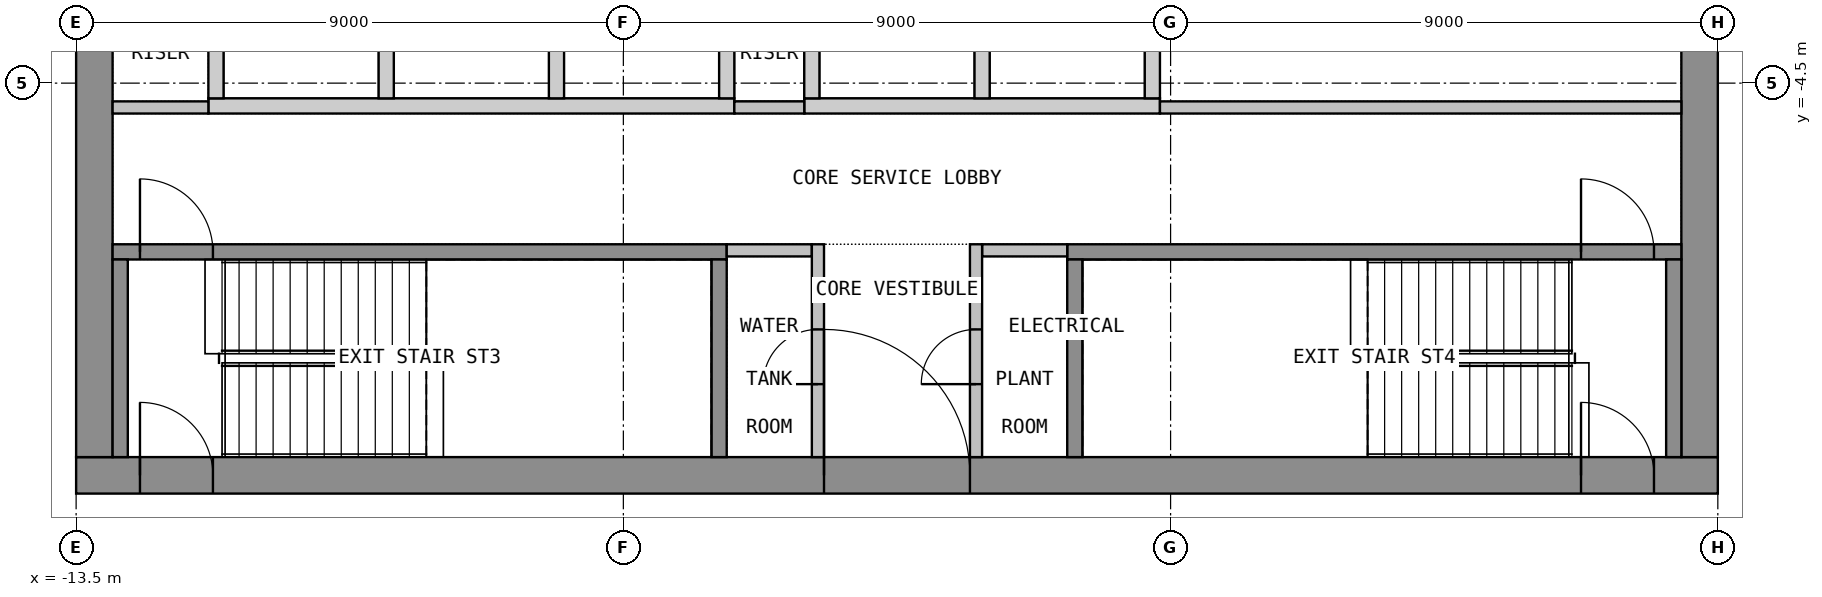
"""IFC4 building model, lengths in metres.
Left out: names, types, materials, properties, quantities, classifications, styles, units other than length and angle.
Written with IfcOpenShell. Run it as: python <this file> out.ifc"""

import sys

from ifc_helpers import new_model, si_unit, direction, frame, frame_2d, origin, place, context, subcontext, project, spatial, polyline, rectangle, outline, extrude, element, fill, save


model = new_model("IFC4")
c1 = context("Model", 3, precision=1e-05, world=origin(), true_north=direction((0.0, 1.0)))
c2 = subcontext(c1, "Body", "Model", "MODEL_VIEW")
j1 = project(units=[si_unit("LENGTHUNIT", "METRE"), si_unit("PLANEANGLEUNIT", "RADIAN")], contexts=[c1])
p1 = place(None, origin())
s1 = spatial("IfcSite", under=j1, at=p1, CompositionType="ELEMENT")
p2 = place(p1, origin())
s2 = spatial("IfcBuilding", under=s1, at=p2, CompositionType="ELEMENT")
p3 = place(p2, frame((0.0, 0.0, 282.0)))
s3 = spatial("IfcBuildingStorey", under=s2, at=p3, CompositionType="ELEMENT", Elevation=282.0)
p4 = place(p3, frame((-13.5, -10.95, 0.0), z_axis=(0.0, 0.0, 1.0), x_axis=(1.0, 0.0, 0.0)))
e1 = element("IfcWall", 1, at=p4, inside=s3, PredefinedType="SHEAR", context=c2, shape_type="SweptSolid", body=[
    extrude(rectangle(XDim=27.0, YDim=0.6, at=frame_2d((13.5, 0.0))), origin(), (0.0, 0.0, 1.0), 4.175),
])
p5 = place(p4, frame((12.3, 0.0, 0.0)))
e2 = element("IfcOpeningElement", 2, at=p5, cuts=e1, PredefinedType="OPENING", context=c2, shape_type="SweptSolid", body=[
    extrude(rectangle(XDim=2.4, YDim=2.1, at=frame_2d((1.2, 1.05))), frame((0.0, 0.31, 0.0), z_axis=(0.0, -1.0, 0.0), x_axis=(1.0, 0.0, 0.0)), (0.0, 0.0, 1.0), 0.62),
])
p6 = place(p4, frame((1.05, 0.0, 0.0)))
e3 = element("IfcOpeningElement", 3, at=p6, cuts=e1, PredefinedType="OPENING", context=c2, shape_type="SweptSolid", body=[
    extrude(rectangle(XDim=1.2, YDim=2.1, at=frame_2d((0.6, 1.05))), frame((0.0, 0.31, 0.0), z_axis=(0.0, -1.0, 0.0), x_axis=(1.0, 0.0, 0.0)), (0.0, 0.0, 1.0), 0.62),
])
p7 = place(p4, frame((24.75, 0.0, 0.0)))
e4 = element("IfcOpeningElement", 4, at=p7, cuts=e1, PredefinedType="OPENING", context=c2, shape_type="SweptSolid", body=[
    extrude(rectangle(XDim=1.2, YDim=2.1, at=frame_2d((0.6, 1.05))), frame((0.0, 0.31, 0.0), z_axis=(0.0, -1.0, 0.0), x_axis=(1.0, 0.0, 0.0)), (0.0, 0.0, 1.0), 0.62),
])
p8 = place(p3, frame((-13.2, -10.65, 0.0), z_axis=(0.0, 0.0, 1.0), x_axis=(0.0, 1.0, 0.0)))
e5 = element("IfcWall", 5, at=p8, inside=s3, PredefinedType="SHEAR", context=c2, shape_type="SweptSolid", body=[
    extrude(rectangle(XDim=21.3, YDim=0.6, at=frame_2d((10.65, 0.0))), origin(), (0.0, 0.0, 1.0), 4.175),
])
p9 = place(p8, frame((9.45, 0.0, 0.0)))
e6 = element("IfcOpeningElement", 6, at=p9, cuts=e5, PredefinedType="OPENING", context=c2, shape_type="SweptSolid", body=[
    extrude(rectangle(XDim=2.4, YDim=2.1, at=frame_2d((1.2, 1.05))), frame((0.0, 0.31, 0.0), z_axis=(0.0, -1.0, 0.0), x_axis=(1.0, 0.0, 0.0)), (0.0, 0.0, 1.0), 0.62),
])
p10 = place(p3, frame((13.2, -10.65, 0.0), z_axis=(0.0, 0.0, 1.0), x_axis=(0.0, 1.0, 0.0)))
e7 = element("IfcWall", 7, at=p10, inside=s3, PredefinedType="SHEAR", context=c2, shape_type="SweptSolid", body=[
    extrude(rectangle(XDim=21.3, YDim=0.6, at=frame_2d((10.65, 0.0))), origin(), (0.0, 0.0, 1.0), 4.175),
])
p11 = place(p10, frame((9.45, 0.0, 0.0)))
e8 = element("IfcOpeningElement", 8, at=p11, cuts=e7, PredefinedType="OPENING", context=c2, shape_type="SweptSolid", body=[
    extrude(rectangle(XDim=2.4, YDim=2.1, at=frame_2d((1.2, 1.05))), frame((0.0, 0.31, 0.0), z_axis=(0.0, -1.0, 0.0), x_axis=(1.0, 0.0, 0.0)), (0.0, 0.0, 1.0), 0.62),
])
p12 = place(p3, origin())
e9 = element("IfcWall", 9, at=p12, inside=s3, PredefinedType="SHEAR", context=c2, shape_type="SweptSolid", body=[
    extrude(outline(polyline([(-11.325, -5.0), (-2.675, -5.0), (-2.675, -4.75), (-11.325, -4.75), (-11.325, -5.0)])), origin(), (0.0, 0.0, 1.0), 4.175),
])
p13 = place(p3, origin())
e10 = element("IfcWall", 10, at=p13, inside=s3, PredefinedType="SHEAR", context=c2, shape_type="SweptSolid", body=[
    extrude(outline(polyline([(-1.525, -5.0), (4.325, -5.0), (4.325, -4.75), (-1.525, -4.75), (-1.525, -5.0)])), origin(), (0.0, 0.0, 1.0), 4.175),
])
p14 = place(p3, origin())
e11 = element("IfcWall", 11, at=p14, inside=s3, PredefinedType="SHEAR", context=c2, shape_type="SweptSolid", body=[
    extrude(outline(polyline([(-11.325, -4.75), (-11.075, -4.75), (-11.075, -2.05), (-11.325, -2.05), (-11.325, -4.75)])), origin(), (0.0, 0.0, 1.0), 4.175),
])
p15 = place(p3, origin())
e12 = element("IfcWall", 12, at=p15, inside=s3, PredefinedType="SHEAR", context=c2, shape_type="SweptSolid", body=[
    extrude(outline(polyline([(-8.525, -4.75), (-8.275, -4.75), (-8.275, -2.05), (-8.525, -2.05), (-8.525, -4.75)])), origin(), (0.0, 0.0, 1.0), 4.175),
])
p16 = place(p3, origin())
e13 = element("IfcWall", 13, at=p16, inside=s3, PredefinedType="SHEAR", context=c2, shape_type="SweptSolid", body=[
    extrude(outline(polyline([(-5.725, -4.75), (-5.475, -4.75), (-5.475, -2.05), (-5.725, -2.05), (-5.725, -4.75)])), origin(), (0.0, 0.0, 1.0), 4.175),
])
p17 = place(p3, origin())
e14 = element("IfcWall", 14, at=p17, inside=s3, PredefinedType="SHEAR", context=c2, shape_type="SweptSolid", body=[
    extrude(outline(polyline([(-2.925, -4.75), (-2.675, -4.75), (-2.675, -2.05), (-2.925, -2.05), (-2.925, -4.75)])), origin(), (0.0, 0.0, 1.0), 4.175),
])
p18 = place(p3, origin())
e15 = element("IfcWall", 15, at=p18, inside=s3, PredefinedType="SHEAR", context=c2, shape_type="SweptSolid", body=[
    extrude(outline(polyline([(-1.525, -4.75), (-1.275, -4.75), (-1.275, -2.05), (-1.525, -2.05), (-1.525, -4.75)])), origin(), (0.0, 0.0, 1.0), 4.175),
])
p19 = place(p3, origin())
e16 = element("IfcWall", 16, at=p19, inside=s3, PredefinedType="SHEAR", context=c2, shape_type="SweptSolid", body=[
    extrude(outline(polyline([(1.275, -4.75), (1.525, -4.75), (1.525, -2.05), (1.275, -2.05), (1.275, -4.75)])), origin(), (0.0, 0.0, 1.0), 4.175),
])
p20 = place(p3, origin())
e17 = element("IfcWall", 17, at=p20, inside=s3, PredefinedType="SHEAR", context=c2, shape_type="SweptSolid", body=[
    extrude(outline(polyline([(4.075, -4.75), (4.325, -4.75), (4.325, -2.05), (4.075, -2.05), (4.075, -4.75)])), origin(), (0.0, 0.0, 1.0), 4.175),
])
p21 = place(p3, frame((-12.9, -7.275, 0.0), z_axis=(0.0, 0.0, 1.0), x_axis=(1.0, 0.0, 0.0)))
e18 = element("IfcWall", 18, at=p21, inside=s3, PredefinedType="SHEAR", context=c2, shape_type="SweptSolid", body=[
    extrude(rectangle(XDim=10.1, YDim=0.25, at=frame_2d((5.05, 0.0))), origin(), (0.0, 0.0, 1.0), 4.175),
])
p22 = place(p21, frame((0.45, 0.0, 0.0)))
e19 = element("IfcOpeningElement", 19, at=p22, cuts=e18, PredefinedType="OPENING", context=c2, shape_type="SweptSolid", body=[
    extrude(rectangle(XDim=1.2, YDim=2.1, at=frame_2d((0.6, 1.05))), frame((0.0, 0.135, 0.0), z_axis=(0.0, -1.0, 0.0), x_axis=(1.0, 0.0, 0.0)), (0.0, 0.0, 1.0), 0.27),
])
for number, where, z_axis, x_axis in (
    (20, (-12.775, -10.65, 0.0), (0.0, 0.0, 1.0), (0.0, 1.0, 0.0)),
    (21, (-2.925, -10.65, 0.0), (0.0, 0.0, 1.0), (0.0, 1.0, 0.0)),
):
    element("IfcWall", number, at=place(p3, frame(where, z_axis=z_axis, x_axis=x_axis)), inside=s3, PredefinedType="SHEAR", context=c2, shape_type="SweptSolid", body=[
        extrude(rectangle(XDim=3.25, YDim=0.25, at=frame_2d((1.625, 0.0))), origin(), (0.0, 0.0, 1.0), 4.175),
    ])
p23 = place(p3, frame((2.8, -7.275, 0.0), z_axis=(0.0, 0.0, 1.0), x_axis=(1.0, 0.0, 0.0)))
e22 = element("IfcWall", 22, at=p23, inside=s3, PredefinedType="SHEAR", context=c2, shape_type="SweptSolid", body=[
    extrude(rectangle(XDim=10.1, YDim=0.25, at=frame_2d((5.05, 0.0))), origin(), (0.0, 0.0, 1.0), 4.175),
])
p24 = place(p23, frame((8.45, 0.0, 0.0)))
e23 = element("IfcOpeningElement", 23, at=p24, cuts=e22, PredefinedType="OPENING", context=c2, shape_type="SweptSolid", body=[
    extrude(rectangle(XDim=1.2, YDim=2.1, at=frame_2d((0.6, 1.05))), frame((0.0, 0.135, 0.0), z_axis=(0.0, -1.0, 0.0), x_axis=(1.0, 0.0, 0.0)), (0.0, 0.0, 1.0), 0.27),
])
for number, where, z_axis, x_axis in (
    (24, (2.925, -10.65, 0.0), (0.0, 0.0, 1.0), (0.0, 1.0, 0.0)),
    (25, (12.775, -10.65, 0.0), (0.0, 0.0, 1.0), (0.0, 1.0, 0.0)),
):
    element("IfcWall", number, at=place(p3, frame(where, z_axis=z_axis, x_axis=x_axis)), inside=s3, PredefinedType="SHEAR", context=c2, shape_type="SweptSolid", body=[
        extrude(rectangle(XDim=3.25, YDim=0.25, at=frame_2d((1.625, 0.0))), origin(), (0.0, 0.0, 1.0), 4.175),
    ])
for number, where, z_axis, x_axis in (
    (26, (-2.8, -7.25, 0.0), (0.0, 0.0, 1.0), (1.0, 0.0, 0.0)),
    (27, (1.4, -7.25, 0.0), (0.0, 0.0, 1.0), (1.0, 0.0, 0.0)),
):
    element("IfcWall", number, at=place(p3, frame(where, z_axis=z_axis, x_axis=x_axis)), inside=s3, PredefinedType="PARTITIONING", context=c2, shape_type="SweptSolid", body=[
        extrude(rectangle(XDim=1.4, YDim=0.2, at=frame_2d((0.7, 0.0))), origin(), (0.0, 0.0, 1.0), 4.175),
    ])
p25 = place(p3, frame((-1.3, -10.65, 0.0), z_axis=(0.0, 0.0, 1.0), x_axis=(0.0, 1.0, 0.0)))
e28 = element("IfcWall", 28, at=p25, inside=s3, PredefinedType="PARTITIONING", context=c2, shape_type="SweptSolid", body=[
    extrude(rectangle(XDim=3.5, YDim=0.2, at=frame_2d((1.75, 0.0))), origin(), (0.0, 0.0, 1.0), 4.175),
])
p26 = place(p25, frame((1.2, 0.0, 0.0)))
e29 = element("IfcOpeningElement", 29, at=p26, cuts=e28, PredefinedType="OPENING", context=c2, shape_type="SweptSolid", body=[
    extrude(rectangle(XDim=0.9, YDim=2.1, at=frame_2d((0.45, 1.05))), frame((0.0, 0.11, 0.0), z_axis=(0.0, -1.0, 0.0), x_axis=(1.0, 0.0, 0.0)), (0.0, 0.0, 1.0), 0.22),
])
p27 = place(p3, frame((1.3, -10.65, 0.0), z_axis=(0.0, 0.0, 1.0), x_axis=(0.0, 1.0, 0.0)))
e30 = element("IfcWall", 30, at=p27, inside=s3, PredefinedType="PARTITIONING", context=c2, shape_type="SweptSolid", body=[
    extrude(rectangle(XDim=3.5, YDim=0.2, at=frame_2d((1.75, 0.0))), origin(), (0.0, 0.0, 1.0), 4.175),
])
p28 = place(p27, frame((1.2, 0.0, 0.0)))
e31 = element("IfcOpeningElement", 31, at=p28, cuts=e30, PredefinedType="OPENING", context=c2, shape_type="SweptSolid", body=[
    extrude(rectangle(XDim=0.9, YDim=2.1, at=frame_2d((0.45, 1.05))), frame((0.0, 0.11, 0.0), z_axis=(0.0, -1.0, 0.0), x_axis=(1.0, 0.0, 0.0)), (0.0, 0.0, 1.0), 0.22),
])
p29 = place(p3, frame((-12.9, -4.9, 0.0), z_axis=(0.0, 0.0, 1.0), x_axis=(1.0, 0.0, 0.0)))
e32 = element("IfcWall", 32, at=p29, inside=s3, PredefinedType="PARTITIONING", context=c2, shape_type="SweptSolid", body=[
    extrude(rectangle(XDim=1.575, YDim=0.2, at=frame_2d((0.788, 0.0))), origin(), (0.0, 0.0, 1.0), 4.175),
])
p30 = place(p3, frame((-2.675, -4.9, 0.0), z_axis=(0.0, 0.0, 1.0), x_axis=(1.0, 0.0, 0.0)))
e33 = element("IfcWall", 33, at=p30, inside=s3, PredefinedType="PARTITIONING", context=c2, shape_type="SweptSolid", body=[
    extrude(rectangle(XDim=1.15, YDim=0.2, at=frame_2d((0.575, 0.0))), origin(), (0.0, 0.0, 1.0), 4.175),
])
p31 = place(p3, frame((4.325, -4.9, 0.0), z_axis=(0.0, 0.0, 1.0), x_axis=(1.0, 0.0, 0.0)))
e34 = element("IfcWall", 34, at=p31, inside=s3, PredefinedType="PARTITIONING", context=c2, shape_type="SweptSolid", body=[
    extrude(rectangle(XDim=8.575, YDim=0.2, at=frame_2d((4.288, 0.0))), origin(), (0.0, 0.0, 1.0), 4.175),
])
p32 = place(p5, origin())
e35 = element("IfcDoor", 35, at=p32, inside=s3, OperationType="DOUBLE_DOOR_DOUBLE_SWING", PredefinedType="DOOR", context=c2, shape_type="SweptSolid", body=[
    extrude(rectangle(XDim=2.4, YDim=2.1, at=frame_2d((1.2, 1.05))), frame((0.0, 0.025, 0.0), z_axis=(0.0, -1.0, 0.0), x_axis=(1.0, 0.0, 0.0)), (0.0, 0.0, 1.0), 0.05),
])
fill(e2, e35)
p33 = place(p6, origin())
e36 = element("IfcDoor", 36, at=p33, inside=s3, OperationType="SINGLE_SWING_RIGHT", PredefinedType="DOOR", context=c2, shape_type="SweptSolid", body=[
    extrude(rectangle(XDim=1.2, YDim=2.1, at=frame_2d((0.6, 1.05))), frame((0.0, 0.025, 0.0), z_axis=(0.0, -1.0, 0.0), x_axis=(1.0, 0.0, 0.0)), (0.0, 0.0, 1.0), 0.05),
])
fill(e3, e36)
p34 = place(p7, origin())
e37 = element("IfcDoor", 37, at=p34, inside=s3, OperationType="SINGLE_SWING_RIGHT", PredefinedType="DOOR", context=c2, shape_type="SweptSolid", body=[
    extrude(rectangle(XDim=1.2, YDim=2.1, at=frame_2d((0.6, 1.05))), frame((0.0, 0.025, 0.0), z_axis=(0.0, -1.0, 0.0), x_axis=(1.0, 0.0, 0.0)), (0.0, 0.0, 1.0), 0.05),
])
fill(e4, e37)
p35 = place(p22, origin())
e38 = element("IfcDoor", 38, at=p35, inside=s3, OperationType="SINGLE_SWING_LEFT", PredefinedType="DOOR", context=c2, shape_type="SweptSolid", body=[
    extrude(rectangle(XDim=1.2, YDim=2.1, at=frame_2d((0.6, 1.05))), frame((0.0, 0.025, 0.0), z_axis=(0.0, -1.0, 0.0), x_axis=(1.0, 0.0, 0.0)), (0.0, 0.0, 1.0), 0.05),
])
fill(e19, e38)
p36 = place(p24, origin())
e39 = element("IfcDoor", 39, at=p36, inside=s3, OperationType="SINGLE_SWING_LEFT", PredefinedType="DOOR", context=c2, shape_type="SweptSolid", body=[
    extrude(rectangle(XDim=1.2, YDim=2.1, at=frame_2d((0.6, 1.05))), frame((0.0, 0.025, 0.0), z_axis=(0.0, -1.0, 0.0), x_axis=(1.0, 0.0, 0.0)), (0.0, 0.0, 1.0), 0.05),
])
fill(e23, e39)
p37 = place(p26, origin())
e40 = element("IfcDoor", 40, at=p37, inside=s3, OperationType="SINGLE_SWING_LEFT", PredefinedType="DOOR", context=c2, shape_type="SweptSolid", body=[
    extrude(rectangle(XDim=0.9, YDim=2.1, at=frame_2d((0.45, 1.05))), frame((0.0, 0.025, 0.0), z_axis=(0.0, -1.0, 0.0), x_axis=(1.0, 0.0, 0.0)), (0.0, 0.0, 1.0), 0.05),
])
fill(e29, e40)
p38 = place(p28, origin())
e41 = element("IfcDoor", 41, at=p38, inside=s3, OperationType="SINGLE_SWING_LEFT", PredefinedType="DOOR", context=c2, shape_type="SweptSolid", body=[
    extrude(rectangle(XDim=0.9, YDim=2.1, at=frame_2d((0.45, 1.05))), frame((0.0, 0.025, 0.0), z_axis=(0.0, -1.0, 0.0), x_axis=(1.0, 0.0, 0.0)), (0.0, 0.0, 1.0), 0.05),
])
fill(e31, e41)
save(model, sys.argv[1])
